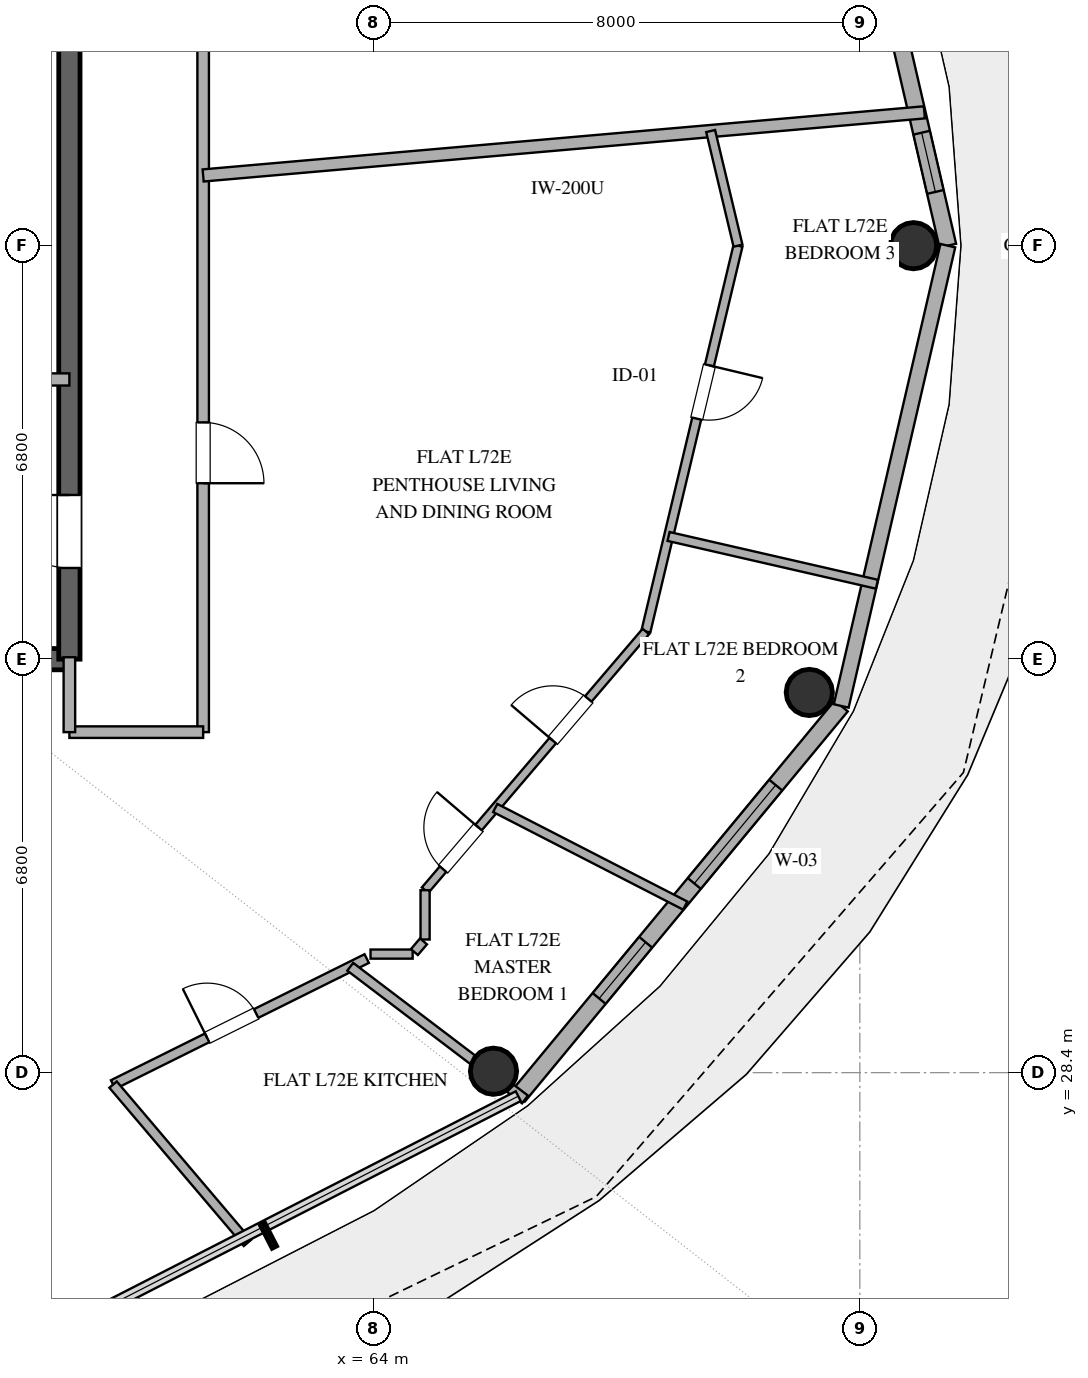
"""IFC4 building model, lengths in metres.
Left out: names, types, materials, properties, quantities, classifications, styles, units other than length and angle.
Written with IfcOpenShell. Run it as: python <this file> out.ifc"""

import sys

from ifc_helpers import new_model, si_unit, direction, frame, frame_2d, origin, origin_2d, place, context, subcontext, project, spatial, rectangle, hollow_circle, extrude, element, fill, save


model = new_model("IFC4")
c1 = context("Model", 3, precision=1e-05, world=origin(), true_north=direction((0.0, 1.0)))
c2 = subcontext(c1, "Body", "Model", "MODEL_VIEW")
j1 = project(units=[si_unit("LENGTHUNIT", "METRE"), si_unit("PLANEANGLEUNIT", "RADIAN")], contexts=[c1])
p1 = place(None, origin())
s1 = spatial("IfcSite", under=j1, at=p1, CompositionType="ELEMENT")
p2 = place(p1, origin())
s2 = spatial("IfcBuilding", under=s1, at=p2, CompositionType="ELEMENT")
p3 = place(p2, frame((0.0, 0.0, 280.2)))
s3 = spatial("IfcBuildingStorey", under=s2, at=p3, CompositionType="ELEMENT", Elevation=280.2)
p4 = place(p3, frame((55.0, 35.2, 0.0), z_axis=(0.0, 0.0, 1.0), x_axis=(1.0, 0.0, 0.0)))
e1 = element("IfcWall", 1, at=p4, inside=s3, PredefinedType="SHEAR", context=c2, shape_type="SweptSolid", body=[
    extrude(rectangle(XDim=4.0, YDim=0.35, at=frame_2d((2.0, 0.0))), origin(), (0.0, 0.0, 1.0), 3.37),
])
p5 = place(p3, frame((59.0, 35.2, 0.0), z_axis=(0.0, 0.0, 1.0), x_axis=(0.0, 1.0, 0.0)))
e2 = element("IfcWall", 2, at=p5, inside=s3, PredefinedType="SHEAR", context=c2, shape_type="SweptSolid", body=[
    extrude(rectangle(XDim=13.6, YDim=0.35, at=frame_2d((6.8, 0.0))), origin(), (0.0, 0.0, 1.0), 3.37),
])
p6 = place(p5, frame((1.5, 0.0, 0.0)))
e3 = element("IfcOpeningElement", 3, at=p6, cuts=e2, PredefinedType="OPENING", context=c2, shape_type="SweptSolid", body=[
    extrude(rectangle(XDim=1.2, YDim=2.15, at=frame_2d((0.6, 1.075))), frame((0.0, 0.185, 0.0), z_axis=(0.0, -1.0, 0.0), x_axis=(1.0, 0.0, 0.0)), (0.0, 0.0, 1.0), 0.37),
])
for number, where, z_axis, x_axis in (
    (4, (72.883, 42.0, 0.0), (0.0, 0.0, 1.0), (1.0, 0.0, 0.0)),
    (5, (65.975, 28.424, 0.0), (0.0, 0.0, 1.0), (1.0, 0.0, 0.0)),
    (6, (71.169, 34.653, 0.0), (0.0, 0.0, 1.0), (1.0, 0.0, 0.0)),
):
    element("IfcColumn", number, at=place(p3, frame(where, z_axis=z_axis, x_axis=x_axis)), inside=s3, PredefinedType="COLUMN", context=c2, shape_type="SweptSolid", body=[
        extrude(hollow_circle(Radius=0.381, WallThickness=0.025, at=origin_2d()), origin(), (0.0, 0.0, 1.0), 3.37),
    ])
p7 = place(p3, frame((73.447, 42.0, 0.0), z_axis=(0.0, 0.0, 1.0), x_axis=(-0.225635078214, 0.974211892495, 0.0)))
e7 = element("IfcWall", 7, at=p7, inside=s3, PredefinedType="SOLIDWALL", context=c2, shape_type="SweptSolid", body=[
    extrude(rectangle(XDim=7.77, YDim=0.28, at=frame_2d((3.885, 0.0))), origin(), (0.0, 0.0, 1.0), 3.37),
])
p8 = place(p7, frame((4.642, 0.0, 0.0)))
e8 = element("IfcOpeningElement", 8, at=p8, cuts=e7, PredefinedType="OPENING", context=c2, shape_type="SweptSolid", body=[
    extrude(rectangle(XDim=1.6, YDim=2.25, at=frame_2d((0.8, 1.125))), frame((0.0, 0.15, 0.0), z_axis=(0.0, -1.0, 0.0), x_axis=(1.0, 0.0, 0.0)), (0.0, 0.0, 1.0), 0.3),
])
p9 = place(p7, frame((0.907, 0.0, 0.85)))
e9 = element("IfcOpeningElement", 9, at=p9, cuts=e7, PredefinedType="OPENING", context=c2, shape_type="SweptSolid", body=[
    extrude(rectangle(XDim=1.0, YDim=1.8, at=frame_2d((0.5, 0.9))), frame((0.0, 0.15, 0.0), z_axis=(0.0, -1.0, 0.0), x_axis=(1.0, 0.0, 0.0)), (0.0, 0.0, 1.0), 0.3),
])
p10 = place(p3, frame((66.383, 28.013, 0.0), z_axis=(0.0, 0.0, 1.0), x_axis=(0.63761509934, 0.770355103243, 0.0)))
e10 = element("IfcWall", 10, at=p10, inside=s3, PredefinedType="SOLIDWALL", context=c2, shape_type="SweptSolid", body=[
    extrude(rectangle(XDim=8.33, YDim=0.28, at=frame_2d((4.165, 0.0))), origin(), (0.0, 0.0, 1.0), 3.37),
])
p11 = place(p10, frame((2.086, 0.0, 0.85)))
e11 = element("IfcOpeningElement", 11, at=p11, cuts=e10, PredefinedType="OPENING", context=c2, shape_type="SweptSolid", body=[
    extrude(rectangle(XDim=1.2, YDim=1.6, at=frame_2d((0.6, 0.8))), frame((0.0, 0.15, 0.0), z_axis=(0.0, -1.0, 0.0), x_axis=(1.0, 0.0, 0.0)), (0.0, 0.0, 1.0), 0.3),
])
p12 = place(p10, frame((4.541, 0.0, 0.85)))
e12 = element("IfcOpeningElement", 12, at=p12, cuts=e10, PredefinedType="OPENING", context=c2, shape_type="SweptSolid", body=[
    extrude(rectangle(XDim=2.1, YDim=2.2, at=frame_2d((1.05, 1.1))), frame((0.0, 0.15, 0.0), z_axis=(0.0, -1.0, 0.0), x_axis=(1.0, 0.0, 0.0)), (0.0, 0.0, 1.0), 0.3),
])
p13 = place(p3, frame((71.694, 34.43, 0.0), z_axis=(0.0, 0.0, 1.0), x_axis=(0.225635078214, 0.974211892495, 0.0)))
e13 = element("IfcWall", 13, at=p13, inside=s3, PredefinedType="SOLIDWALL", context=c2, shape_type="SweptSolid", body=[
    extrude(rectangle(XDim=7.77, YDim=0.25, at=frame_2d((3.885, 0.0))), origin(), (0.0, 0.0, 1.0), 3.37),
])
p14 = place(p3, frame((55.0, 39.8, 0.0), z_axis=(0.0, 0.0, 1.0), x_axis=(1.0, 0.0, 0.0)))
e14 = element("IfcWall", 14, at=p14, inside=s3, PredefinedType="SOLIDWALL", context=c2, shape_type="SweptSolid", body=[
    extrude(rectangle(XDim=4.0, YDim=0.2, at=frame_2d((2.0, 0.0))), origin(), (0.0, 0.0, 1.0), 2.73),
])
p15 = place(p14, frame((1.45, 0.0, 0.0)))
e15 = element("IfcOpeningElement", 15, at=p15, cuts=e14, PredefinedType="OPENING", context=c2, shape_type="SweptSolid", body=[
    extrude(rectangle(XDim=1.1, YDim=2.15, at=frame_2d((0.55, 1.075))), frame((0.0, 0.11, 0.0), z_axis=(0.0, -1.0, 0.0), x_axis=(1.0, 0.0, 0.0)), (0.0, 0.0, 1.0), 0.22),
])
p16 = place(p3, frame((61.2, 50.9, 0.0), z_axis=(0.0, 0.0, 1.0), x_axis=(0.0, -1.0, 0.0)))
e16 = element("IfcWall", 16, at=p16, inside=s3, PredefinedType="PARTITIONING", context=c2, shape_type="SweptSolid", body=[
    extrude(rectangle(XDim=16.9, YDim=0.19, at=frame_2d((8.45, 0.0))), origin(), (0.0, 0.0, 1.0), 2.73),
])
p17 = place(p16, frame((11.807, 0.0, 0.0)))
e17 = element("IfcOpeningElement", 17, at=p17, cuts=e16, PredefinedType="OPENING", context=c2, shape_type="SweptSolid", body=[
    extrude(rectangle(XDim=1.0, YDim=2.2, at=frame_2d((0.5, 1.1))), frame((0.0, 0.105, 0.0), z_axis=(0.0, -1.0, 0.0), x_axis=(1.0, 0.0, 0.0)), (0.0, 0.0, 1.0), 0.21),
])
p18 = place(p16, frame((3.389, 0.0, 0.0)))
e18 = element("IfcOpeningElement", 18, at=p18, cuts=e16, PredefinedType="OPENING", context=c2, shape_type="SweptSolid", body=[
    extrude(rectangle(XDim=1.0, YDim=2.2, at=frame_2d((0.5, 1.1))), frame((0.0, 0.105, 0.0), z_axis=(0.0, -1.0, 0.0), x_axis=(1.0, 0.0, 0.0)), (0.0, 0.0, 1.0), 0.21),
])
p19 = place(p3, frame((73.061, 44.192, 0.0), z_axis=(0.0, 0.0, 1.0), x_axis=(-0.996195520097, -0.087146346673, 0.0)))
e19 = element("IfcWall", 19, at=p19, inside=s3, PredefinedType="PARTITIONING", context=c2, shape_type="SweptSolid", body=[
    extrude(rectangle(XDim=11.906, YDim=0.2, at=frame_2d((5.953, 0.0))), origin(), (0.0, 0.0, 1.0), 2.73),
])
p20 = place(p3, frame((69.996, 42.0, 0.0), z_axis=(0.0, 0.0, 1.0), x_axis=(-0.232298462197, -0.972644551962, 0.0)))
e20 = element("IfcWall", 20, at=p20, inside=s3, PredefinedType="PARTITIONING", context=c2, shape_type="SweptSolid", body=[
    extrude(rectangle(XDim=6.523, YDim=0.15, at=frame_2d((3.262, 0.0))), origin(), (0.0, 0.0, 1.0), 2.73),
])
p21 = place(p20, frame((2.024, 0.0, 0.0)))
e21 = element("IfcOpeningElement", 21, at=p21, cuts=e20, PredefinedType="OPENING", context=c2, shape_type="SweptSolid", body=[
    extrude(rectangle(XDim=0.9, YDim=2.1, at=frame_2d((0.45, 1.05))), frame((0.0, 0.085, 0.0), z_axis=(0.0, -1.0, 0.0), x_axis=(1.0, 0.0, 0.0)), (0.0, 0.0, 1.0), 0.17),
])
p22 = place(p3, frame((59.718, 28.204, 0.0), z_axis=(0.0, 0.0, 1.0), x_axis=(0.895587741002, 0.444884926882, 0.0)))
e22 = element("IfcWall", 22, at=p22, inside=s3, PredefinedType="PLUMBINGWALL", context=c2, shape_type="SweptSolid", body=[
    extrude(rectangle(XDim=4.658, YDim=0.16, at=frame_2d((2.329, 0.0))), origin(), (0.0, 0.0, 1.0), 2.73),
])
p23 = place(p22, frame((1.728, 0.0, 0.0)))
e23 = element("IfcOpeningElement", 23, at=p23, cuts=e22, PredefinedType="OPENING", context=c2, shape_type="SweptSolid", body=[
    extrude(rectangle(XDim=0.9, YDim=2.1, at=frame_2d((0.45, 1.05))), frame((0.0, 0.09, 0.0), z_axis=(0.0, -1.0, 0.0), x_axis=(1.0, 0.0, 0.0)), (0.0, 0.0, 1.0), 0.18),
])
p24 = place(p3, frame((64.85, 31.401, 0.0), z_axis=(0.0, 0.0, 1.0), x_axis=(0.649208179997, 0.760610767097, 0.0)))
e24 = element("IfcWall", 24, at=p24, inside=s3, PredefinedType="PARTITIONING", context=c2, shape_type="SweptSolid", body=[
    extrude(rectangle(XDim=5.593, YDim=0.14, at=frame_2d((2.796, 0.0))), origin(), (0.0, 0.0, 1.0), 2.73),
])
p25 = place(p24, frame((3.235, 0.0, 0.0)))
e25 = element("IfcOpeningElement", 25, at=p25, cuts=e24, PredefinedType="OPENING", context=c2, shape_type="SweptSolid", body=[
    extrude(rectangle(XDim=0.9, YDim=2.1, at=frame_2d((0.45, 1.05))), frame((0.0, 0.08, 0.0), z_axis=(0.0, -1.0, 0.0), x_axis=(1.0, 0.0, 0.0)), (0.0, 0.0, 1.0), 0.16),
])
p26 = place(p24, frame((0.455, 0.0, 0.0)))
e26 = element("IfcOpeningElement", 26, at=p26, cuts=e24, PredefinedType="OPENING", context=c2, shape_type="SweptSolid", body=[
    extrude(rectangle(XDim=0.9, YDim=2.1, at=frame_2d((0.45, 1.05))), frame((0.0, 0.08, 0.0), z_axis=(0.0, -1.0, 0.0), x_axis=(1.0, 0.0, 0.0)), (0.0, 0.0, 1.0), 0.16),
])
p27 = place(p3, frame((63.619, 30.142, 0.0), z_axis=(0.0, 0.0, 1.0), x_axis=(0.796471054337, -0.604676657068, 0.0)))
e27 = element("IfcWall", 27, at=p27, inside=s3, PredefinedType="PLUMBINGWALL", context=c2, shape_type="SweptSolid", body=[
    extrude(rectangle(XDim=3.609, YDim=0.16, at=frame_2d((1.804, 0.0))), origin(), (0.0, 0.0, 1.0), 2.73),
])
p28 = place(p3, frame((72.281, 36.432, 0.0), z_axis=(0.0, 0.0, 1.0), x_axis=(-0.974703956651, 0.223499881182, 0.0)))
e28 = element("IfcWall", 28, at=p28, inside=s3, PredefinedType="PARTITIONING", context=c2, shape_type="SweptSolid", body=[
    extrude(rectangle(XDim=3.515, YDim=0.15, at=frame_2d((1.758, 0.0))), origin(), (0.0, 0.0, 1.0), 2.73),
])
p29 = place(p3, frame((69.129, 31.148, 0.0), z_axis=(0.0, 0.0, 1.0), x_axis=(-0.889538013169, 0.456861163951, 0.0)))
e29 = element("IfcWall", 29, at=p29, inside=s3, PredefinedType="PARTITIONING", context=c2, shape_type="SweptSolid", body=[
    extrude(rectangle(XDim=3.513, YDim=0.15, at=frame_2d((1.756, 0.0))), origin(), (0.0, 0.0, 1.0), 2.73),
])
p30 = place(p3, frame((61.929, 25.601, 0.0), z_axis=(0.0, 0.0, 1.0), x_axis=(-0.64737032118, 0.762175614446, 0.0)))
e30 = element("IfcWall", 30, at=p30, inside=s3, PredefinedType="PLUMBINGWALL", context=c2, shape_type="SweptSolid", body=[
    extrude(rectangle(XDim=3.415, YDim=0.16, at=frame_2d((1.708, 0.0))), origin(), (0.0, 0.0, 1.0), 2.73),
])
p31 = place(p3, frame((61.2, 34.0, 0.0), z_axis=(0.0, 0.0, 1.0), x_axis=(-1.0, 0.0, 0.0)))
e31 = element("IfcWall", 31, at=p31, inside=s3, PredefinedType="PARTITIONING", context=c2, shape_type="SweptSolid", body=[
    extrude(rectangle(XDim=2.2, YDim=0.19, at=frame_2d((1.1, 0.0))), origin(), (0.0, 0.0, 1.0), 2.73),
])
p32 = place(p3, frame((69.546, 43.885, 0.0), z_axis=(0.0, 0.0, 1.0), x_axis=(0.232296027223, -0.972645133508, 0.0)))
e32 = element("IfcWall", 32, at=p32, inside=s3, PredefinedType="PARTITIONING", context=c2, shape_type="SweptSolid", body=[
    extrude(rectangle(XDim=1.938, YDim=0.15, at=frame_2d((0.969, 0.0))), origin(), (0.0, 0.0, 1.0), 2.73),
])
p33 = place(p3, frame((59.0, 34.0, 0.0), z_axis=(0.0, 0.0, 1.0), x_axis=(0.0, 1.0, 0.0)))
e33 = element("IfcWall", 33, at=p33, inside=s3, PredefinedType="PARTITIONING", context=c2, shape_type="SweptSolid", body=[
    extrude(rectangle(XDim=1.232, YDim=0.19, at=frame_2d((0.616, 0.0))), origin(), (0.0, 0.0, 1.0), 2.73),
])
p34 = place(p3, frame((64.85, 31.401, 0.0), z_axis=(0.0, 0.0, 1.0), x_axis=(0.0, -1.0, 0.0)))
e34 = element("IfcWall", 34, at=p34, inside=s3, PredefinedType="PARTITIONING", context=c2, shape_type="SweptSolid", body=[
    extrude(rectangle(XDim=0.812, YDim=0.15, at=frame_2d((0.406, 0.0))), origin(), (0.0, 0.0, 1.0), 2.73),
])
p35 = place(p3, frame((64.646, 30.35, 0.0), z_axis=(0.0, 0.0, 1.0), x_axis=(-1.0, 0.0, 0.0)))
e35 = element("IfcWall", 35, at=p35, inside=s3, PredefinedType="PARTITIONING", context=c2, shape_type="SweptSolid", body=[
    extrude(rectangle(XDim=0.693, YDim=0.15, at=frame_2d((0.346, 0.0))), origin(), (0.0, 0.0, 1.0), 2.73),
])
p36 = place(p3, frame((64.824, 30.559, 0.0), z_axis=(0.0, 0.0, 1.0), x_axis=(-0.648874632887, -0.760895334981, 0.0)))
e36 = element("IfcWall", 36, at=p36, inside=s3, PredefinedType="PARTITIONING", context=c2, shape_type="SweptSolid", body=[
    extrude(rectangle(XDim=0.231, YDim=0.15, at=frame_2d((0.115, 0.0))), origin(), (0.0, 0.0, 1.0), 2.73),
])
p37 = place(p11, origin())
e37 = element("IfcWindow", 37, at=p37, inside=s3, PartitioningType="SINGLE_PANEL", PredefinedType="WINDOW", context=c2, shape_type="SweptSolid", body=[
    extrude(rectangle(XDim=1.2, YDim=1.6, at=frame_2d((0.6, 0.8))), frame((0.0, 0.03, 0.0), z_axis=(0.0, -1.0, 0.0), x_axis=(1.0, 0.0, 0.0)), (0.0, 0.0, 1.0), 0.06),
])
fill(e11, e37)
p38 = place(p12, origin())
e38 = element("IfcWindow", 38, at=p38, inside=s3, PartitioningType="SINGLE_PANEL", PredefinedType="WINDOW", context=c2, shape_type="SweptSolid", body=[
    extrude(rectangle(XDim=2.1, YDim=2.2, at=frame_2d((1.05, 1.1))), frame((0.0, 0.03, 0.0), z_axis=(0.0, -1.0, 0.0), x_axis=(1.0, 0.0, 0.0)), (0.0, 0.0, 1.0), 0.06),
])
fill(e12, e38)
p39 = place(p9, origin())
e39 = element("IfcWindow", 39, at=p39, inside=s3, PartitioningType="SINGLE_PANEL", PredefinedType="WINDOW", context=c2, shape_type="SweptSolid", body=[
    extrude(rectangle(XDim=1.0, YDim=1.8, at=frame_2d((0.5, 0.9))), frame((0.0, 0.03, 0.0), z_axis=(0.0, -1.0, 0.0), x_axis=(1.0, 0.0, 0.0)), (0.0, 0.0, 1.0), 0.06),
])
fill(e9, e39)
p40 = place(p6, origin())
e40 = element("IfcDoor", 40, at=p40, inside=s3, OperationType="SINGLE_SWING_RIGHT", PredefinedType="DOOR", context=c2, shape_type="SweptSolid", body=[
    extrude(rectangle(XDim=1.2, YDim=2.15, at=frame_2d((0.6, 1.075))), frame((0.0, 0.025, 0.0), z_axis=(0.0, -1.0, 0.0), x_axis=(1.0, 0.0, 0.0)), (0.0, 0.0, 1.0), 0.05),
])
fill(e3, e40)
p41 = place(p17, origin())
e41 = element("IfcDoor", 41, at=p41, inside=s3, OperationType="SINGLE_SWING_RIGHT", PredefinedType="DOOR", context=c2, shape_type="SweptSolid", body=[
    extrude(rectangle(XDim=1.0, YDim=2.2, at=frame_2d((0.5, 1.1))), frame((0.0, 0.025, 0.0), z_axis=(0.0, -1.0, 0.0), x_axis=(1.0, 0.0, 0.0)), (0.0, 0.0, 1.0), 0.05),
])
fill(e17, e41)
p42 = place(p21, origin())
e42 = element("IfcDoor", 42, at=p42, inside=s3, OperationType="SINGLE_SWING_LEFT", PredefinedType="DOOR", context=c2, shape_type="SweptSolid", body=[
    extrude(rectangle(XDim=0.9, YDim=2.1, at=frame_2d((0.45, 1.05))), frame((0.0, 0.025, 0.0), z_axis=(0.0, -1.0, 0.0), x_axis=(1.0, 0.0, 0.0)), (0.0, 0.0, 1.0), 0.05),
])
fill(e21, e42)
p43 = place(p23, origin())
e43 = element("IfcDoor", 43, at=p43, inside=s3, OperationType="SINGLE_SWING_LEFT", PredefinedType="DOOR", context=c2, shape_type="SweptSolid", body=[
    extrude(rectangle(XDim=0.9, YDim=2.1, at=frame_2d((0.45, 1.05))), frame((0.0, 0.025, 0.0), z_axis=(0.0, -1.0, 0.0), x_axis=(1.0, 0.0, 0.0)), (0.0, 0.0, 1.0), 0.05),
])
fill(e23, e43)
p44 = place(p25, origin())
e44 = element("IfcDoor", 44, at=p44, inside=s3, OperationType="SINGLE_SWING_LEFT", PredefinedType="DOOR", context=c2, shape_type="SweptSolid", body=[
    extrude(rectangle(XDim=0.9, YDim=2.1, at=frame_2d((0.45, 1.05))), frame((0.0, 0.025, 0.0), z_axis=(0.0, -1.0, 0.0), x_axis=(1.0, 0.0, 0.0)), (0.0, 0.0, 1.0), 0.05),
])
fill(e25, e44)
p45 = place(p26, origin())
e45 = element("IfcDoor", 45, at=p45, inside=s3, OperationType="SINGLE_SWING_RIGHT", PredefinedType="DOOR", context=c2, shape_type="SweptSolid", body=[
    extrude(rectangle(XDim=0.9, YDim=2.1, at=frame_2d((0.45, 1.05))), frame((0.0, 0.025, 0.0), z_axis=(0.0, -1.0, 0.0), x_axis=(1.0, 0.0, 0.0)), (0.0, 0.0, 1.0), 0.05),
])
fill(e26, e45)
save(model, sys.argv[1])
